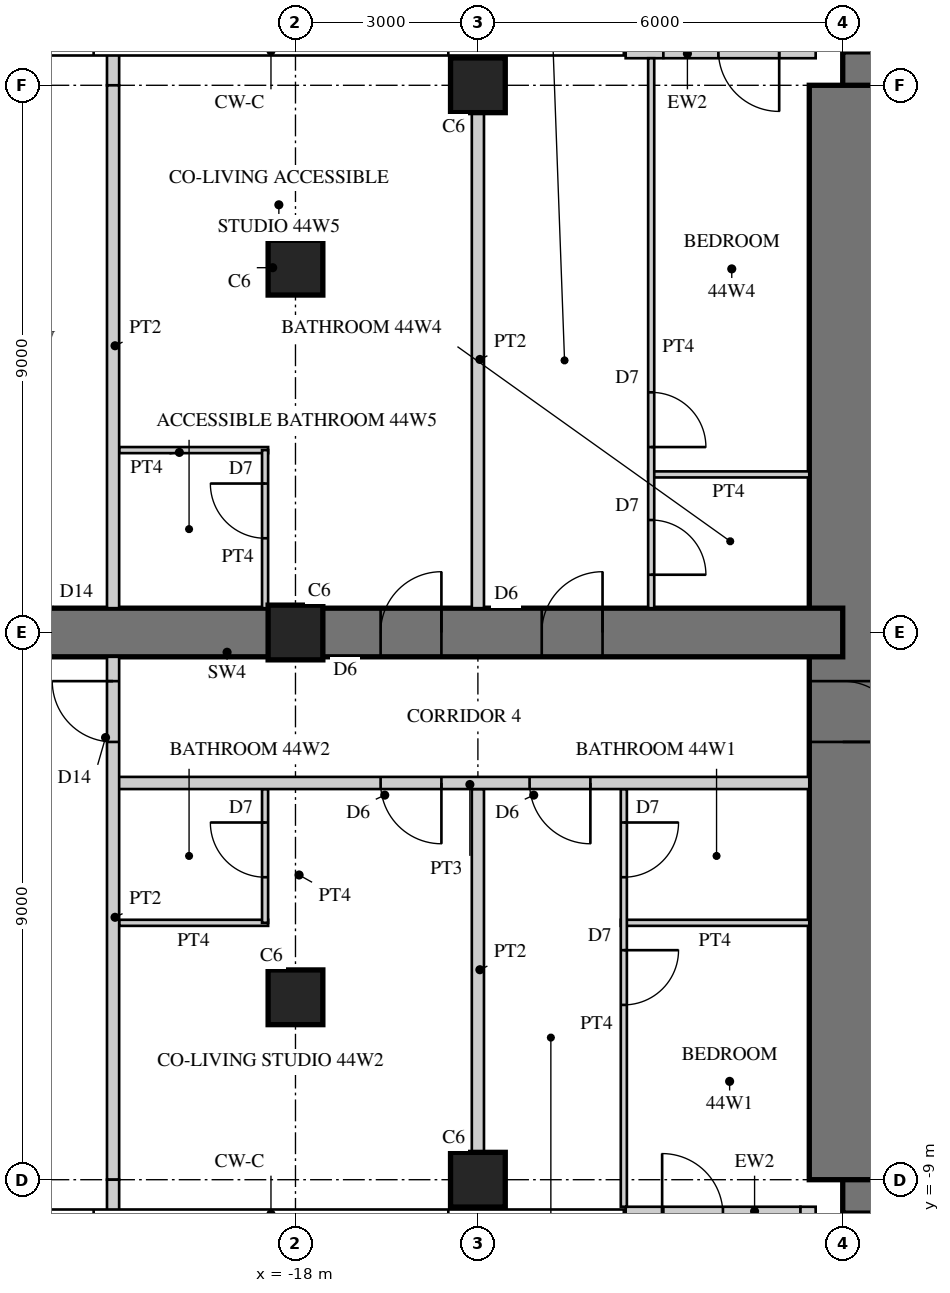
"""IFC4 building model, lengths in metres.
Left out: names, types, materials, properties, quantities, classifications, styles, units other than length and angle.
Written with IfcOpenShell. Run it as: python <this file> out.ifc"""

import sys

from ifc_helpers import new_model, si_unit, direction, frame, frame_2d, origin, origin_2d, place, context, subcontext, project, spatial, rectangle, hollow_rectangle, extrude, element, fill, save


model = new_model("IFC4")
c1 = context("Model", 3, precision=1e-05, world=origin(), true_north=direction((0.0, 1.0)))
c2 = subcontext(c1, "Body", "Model", "MODEL_VIEW")
j1 = project(units=[si_unit("LENGTHUNIT", "METRE"), si_unit("PLANEANGLEUNIT", "RADIAN")], contexts=[c1])
p1 = place(None, origin())
s1 = spatial("IfcSite", under=j1, at=p1, CompositionType="ELEMENT")
p2 = place(p1, origin())
s2 = spatial("IfcBuilding", under=s1, at=p2, CompositionType="ELEMENT")
p3 = place(p2, frame((0.0, 0.0, 179.7)))
s3 = spatial("IfcBuildingStorey", under=s2, at=p3, CompositionType="ELEMENT", Elevation=179.7)
p4 = place(p3, frame((9.0, 9.0, 0.0), z_axis=(0.0, 0.0, 1.0), x_axis=(-1.0, 0.0, 0.0)))
e1 = element("IfcWall", 1, at=p4, inside=s3, PredefinedType="SHEAR", context=c2, shape_type="SweptSolid", body=[
    extrude(rectangle(XDim=18.0, YDim=1.1, at=frame_2d((9.0, 0.0))), origin(), (0.0, 0.0, 1.0), 3.4),
])
p5 = place(p4, frame((9.8, 0.0, 0.0)))
e2 = element("IfcOpeningElement", 2, at=p5, cuts=e1, PredefinedType="OPENING", context=c2, shape_type="SweptSolid", body=[
    extrude(rectangle(XDim=1.0, YDim=2.4, at=frame_2d((0.5, 1.2))), frame((0.0, 0.56, 0.0), z_axis=(0.0, -1.0, 0.0), x_axis=(1.0, 0.0, 0.0)), (0.0, 0.0, 1.0), 1.12),
])
p6 = place(p3, frame((-9.0, -9.0, 0.0), z_axis=(0.0, 0.0, 1.0), x_axis=(1.0, 0.0, 0.0)))
e3 = element("IfcWall", 3, at=p6, inside=s3, PredefinedType="SHEAR", context=c2, shape_type="SweptSolid", body=[
    extrude(rectangle(XDim=18.0, YDim=1.1, at=frame_2d((9.0, 0.0))), origin(), (0.0, 0.0, 1.0), 3.4),
])
p7 = place(p6, frame((9.8, 0.0, 0.0)))
e4 = element("IfcOpeningElement", 4, at=p7, cuts=e3, PredefinedType="OPENING", context=c2, shape_type="SweptSolid", body=[
    extrude(rectangle(XDim=1.0, YDim=2.4, at=frame_2d((0.5, 1.2))), frame((0.0, 0.56, 0.0), z_axis=(0.0, -1.0, 0.0), x_axis=(1.0, 0.0, 0.0)), (0.0, 0.0, 1.0), 1.12),
])
p8 = place(p3, frame((-9.0, 9.0, 0.0), z_axis=(0.0, 0.0, 1.0), x_axis=(0.0, -1.0, 0.0)))
e5 = element("IfcWall", 5, at=p8, inside=s3, PredefinedType="SHEAR", context=c2, shape_type="SweptSolid", body=[
    extrude(rectangle(XDim=18.0, YDim=1.1, at=frame_2d((9.0, 0.0))), origin(), (0.0, 0.0, 1.0), 3.4),
])
p9 = place(p8, frame((9.8, 0.0, 0.0)))
e6 = element("IfcOpeningElement", 6, at=p9, cuts=e5, PredefinedType="OPENING", context=c2, shape_type="SweptSolid", body=[
    extrude(rectangle(XDim=1.0, YDim=2.4, at=frame_2d((0.5, 1.2))), frame((0.0, 0.56, 0.0), z_axis=(0.0, -1.0, 0.0), x_axis=(1.0, 0.0, 0.0)), (0.0, 0.0, 1.0), 1.12),
])
p10 = place(p3, frame((-9.0, 0.0, 0.0), z_axis=(0.0, 0.0, 1.0), x_axis=(-1.0, 0.0, 0.0)))
e7 = element("IfcWall", 7, at=p10, inside=s3, PredefinedType="SHEAR", context=c2, shape_type="SweptSolid", body=[
    extrude(rectangle(XDim=18.0, YDim=0.8, at=frame_2d((9.0, 0.0))), origin(), (0.0, 0.0, 1.0), 3.4),
])
p11 = place(p10, frame((3.95, 0.0, 0.0)))
e8 = element("IfcOpeningElement", 8, at=p11, cuts=e7, PredefinedType="OPENING", context=c2, shape_type="SweptSolid", body=[
    extrude(rectangle(XDim=1.0, YDim=2.15, at=frame_2d((0.5, 1.075))), frame((0.0, 0.41, 0.0), z_axis=(0.0, -1.0, 0.0), x_axis=(1.0, 0.0, 0.0)), (0.0, 0.0, 1.0), 0.82),
])
p12 = place(p10, frame((6.6, 0.0, 0.0)))
e9 = element("IfcOpeningElement", 9, at=p12, cuts=e7, PredefinedType="OPENING", context=c2, shape_type="SweptSolid", body=[
    extrude(rectangle(XDim=1.0, YDim=2.15, at=frame_2d((0.5, 1.075))), frame((0.0, 0.41, 0.0), z_axis=(0.0, -1.0, 0.0), x_axis=(1.0, 0.0, 0.0)), (0.0, 0.0, 1.0), 0.82),
])
p13 = place(p10, frame((13.25, 0.0, 0.0)))
e10 = element("IfcOpeningElement", 10, at=p13, cuts=e7, PredefinedType="OPENING", context=c2, shape_type="SweptSolid", body=[
    extrude(rectangle(XDim=1.0, YDim=2.2, at=frame_2d((0.5, 1.1))), frame((0.0, 0.41, 0.0), z_axis=(0.0, -1.0, 0.0), x_axis=(1.0, 0.0, 0.0)), (0.0, 0.0, 1.0), 0.82),
])
for number, where, z_axis, x_axis in (
    (11, (-15.0, 9.0, 0.0), (0.0, 0.0, 1.0), (1.0, 0.0, 0.0)),
    (12, (-15.0, -9.0, 0.0), (0.0, 0.0, 1.0), (1.0, 0.0, 0.0)),
    (13, (-18.0, 6.0, 0.0), (0.0, 0.0, 1.0), (1.0, 0.0, 0.0)),
    (14, (-18.0, 0.0, 0.0), (0.0, 0.0, 1.0), (1.0, 0.0, 0.0)),
    (15, (-18.0, -6.0, 0.0), (0.0, 0.0, 1.0), (1.0, 0.0, 0.0)),
):
    element("IfcColumn", number, at=place(p3, frame(where, z_axis=z_axis, x_axis=x_axis)), inside=s3, PredefinedType="COLUMN", context=c2, shape_type="SweptSolid", body=[
        extrude(rectangle(XDim=0.9, YDim=0.9, at=origin_2d()), origin(), (0.0, 0.0, 1.0), 3.4),
    ])
p14 = place(p3, frame((-9.445, 9.57, 0.0), z_axis=(0.0, 0.0, 1.0), x_axis=(-1.0, 0.0, 0.0)))
e16 = element("IfcWall", 16, at=p14, inside=s3, PredefinedType="SOLIDWALL", context=c2, shape_type="SweptSolid", body=[
    extrude(rectangle(XDim=3.125, YDim=0.25, at=frame_2d((1.562, 0.0))), origin(), (0.0, 0.0, 1.0), 3.22),
])
p15 = place(p14, frame((0.6, 0.0, 0.0)))
e17 = element("IfcOpeningElement", 17, at=p15, cuts=e16, PredefinedType="OPENING", context=c2, shape_type="SweptSolid", body=[
    extrude(rectangle(XDim=1.0, YDim=2.2, at=frame_2d((0.5, 1.1))), frame((0.0, 0.135, 0.0), z_axis=(0.0, -1.0, 0.0), x_axis=(1.0, 0.0, 0.0)), (0.0, 0.0, 1.0), 0.27),
])
p16 = place(p3, frame((-12.57, -9.57, 0.0), z_axis=(0.0, 0.0, 1.0), x_axis=(1.0, 0.0, 0.0)))
e18 = element("IfcWall", 18, at=p16, inside=s3, PredefinedType="SOLIDWALL", context=c2, shape_type="SweptSolid", body=[
    extrude(rectangle(XDim=2.875, YDim=0.25, at=frame_2d((1.438, 0.0))), origin(), (0.0, 0.0, 1.0), 3.22),
])
p17 = place(p16, frame((0.6, 0.0, 0.0)))
e19 = element("IfcOpeningElement", 19, at=p17, cuts=e18, PredefinedType="OPENING", context=c2, shape_type="SweptSolid", body=[
    extrude(rectangle(XDim=1.0, YDim=2.2, at=frame_2d((0.5, 1.1))), frame((0.0, 0.135, 0.0), z_axis=(0.0, -1.0, 0.0), x_axis=(1.0, 0.0, 0.0)), (0.0, 0.0, 1.0), 0.27),
])
p18 = place(p3, frame((-9.57, -9.445, 0.0), z_axis=(0.0, 0.0, 1.0), x_axis=(0.0, -1.0, 0.0)))
e20 = element("IfcWall", 20, at=p18, inside=s3, PredefinedType="SOLIDWALL", context=c2, shape_type="SweptSolid", body=[
    extrude(rectangle(XDim=3.125, YDim=0.25, at=frame_2d((1.562, 0.0))), origin(), (0.0, 0.0, 1.0), 3.22),
])
p19 = place(p18, frame((0.6, 0.0, 0.0)))
e21 = element("IfcOpeningElement", 21, at=p19, cuts=e20, PredefinedType="OPENING", context=c2, shape_type="SweptSolid", body=[
    extrude(rectangle(XDim=1.0, YDim=2.2, at=frame_2d((0.5, 1.1))), frame((0.0, 0.135, 0.0), z_axis=(0.0, -1.0, 0.0), x_axis=(1.0, 0.0, 0.0)), (0.0, 0.0, 1.0), 0.27),
])
p20 = place(p3, frame((-9.55, -4.775, 0.0), z_axis=(0.0, 0.0, 1.0), x_axis=(-1.0, 0.0, 0.0)))
e22 = element("IfcWall", 22, at=p20, inside=s3, PredefinedType="PARTITIONING", context=c2, shape_type="SweptSolid", body=[
    extrude(rectangle(XDim=3.1, YDim=0.1, at=frame_2d((1.55, 0.0))), origin(), (0.0, 0.0, 1.0), 3.22),
])
p21 = place(p3, frame((-12.6, -2.575, 0.0), z_axis=(0.0, 0.0, 1.0), x_axis=(0.0, -1.0, 0.0)))
e23 = element("IfcWall", 23, at=p21, inside=s3, PredefinedType="PARTITIONING", context=c2, shape_type="SweptSolid", body=[
    extrude(rectangle(XDim=6.87, YDim=0.1, at=frame_2d((3.435, 0.0))), origin(), (0.0, 0.0, 1.0), 3.22),
])
p22 = place(p21, frame((0.55, 0.0, 0.0)))
e24 = element("IfcOpeningElement", 24, at=p22, cuts=e23, PredefinedType="OPENING", context=c2, shape_type="SweptSolid", body=[
    extrude(rectangle(XDim=0.9, YDim=2.1, at=frame_2d((0.45, 1.05))), frame((0.0, 0.06, 0.0), z_axis=(0.0, -1.0, 0.0), x_axis=(1.0, 0.0, 0.0)), (0.0, 0.0, 1.0), 0.12),
])
p23 = place(p21, frame((2.65, 0.0, 0.0)))
e25 = element("IfcOpeningElement", 25, at=p23, cuts=e23, PredefinedType="OPENING", context=c2, shape_type="SweptSolid", body=[
    extrude(rectangle(XDim=0.9, YDim=2.1, at=frame_2d((0.45, 1.05))), frame((0.0, 0.06, 0.0), z_axis=(0.0, -1.0, 0.0), x_axis=(1.0, 0.0, 0.0)), (0.0, 0.0, 1.0), 0.12),
])
p24 = place(p3, frame((-9.55, 2.6, 0.0), z_axis=(0.0, 0.0, 1.0), x_axis=(-1.0, 0.0, 0.0)))
e26 = element("IfcWall", 26, at=p24, inside=s3, PredefinedType="PARTITIONING", context=c2, shape_type="SweptSolid", body=[
    extrude(rectangle(XDim=2.65, YDim=0.1, at=frame_2d((1.325, 0.0))), origin(), (0.0, 0.0, 1.0), 3.22),
])
p25 = place(p3, frame((-12.15, 9.445, 0.0), z_axis=(0.0, 0.0, 1.0), x_axis=(0.0, -1.0, 0.0)))
e27 = element("IfcWall", 27, at=p25, inside=s3, PredefinedType="PARTITIONING", context=c2, shape_type="SweptSolid", body=[
    extrude(rectangle(XDim=9.045, YDim=0.1, at=frame_2d((4.522, 0.0))), origin(), (0.0, 0.0, 1.0), 3.22),
])
p26 = place(p25, frame((5.495, 0.0, 0.0)))
e28 = element("IfcOpeningElement", 28, at=p26, cuts=e27, PredefinedType="OPENING", context=c2, shape_type="SweptSolid", body=[
    extrude(rectangle(XDim=0.9, YDim=2.1, at=frame_2d((0.45, 1.05))), frame((0.0, 0.06, 0.0), z_axis=(0.0, -1.0, 0.0), x_axis=(1.0, 0.0, 0.0)), (0.0, 0.0, 1.0), 0.12),
])
p27 = place(p25, frame((7.595, 0.0, 0.0)))
e29 = element("IfcOpeningElement", 29, at=p27, cuts=e27, PredefinedType="OPENING", context=c2, shape_type="SweptSolid", body=[
    extrude(rectangle(XDim=0.9, YDim=2.1, at=frame_2d((0.45, 1.05))), frame((0.0, 0.06, 0.0), z_axis=(0.0, -1.0, 0.0), x_axis=(1.0, 0.0, 0.0)), (0.0, 0.0, 1.0), 0.12),
])
p28 = place(p3, frame((-15.0, -2.575, 0.0), z_axis=(0.0, 0.0, 1.0), x_axis=(0.0, -1.0, 0.0)))
e30 = element("IfcWall", 30, at=p28, inside=s3, PredefinedType="SOLIDWALL", context=c2, shape_type="SweptSolid", body=[
    extrude(rectangle(XDim=5.975, YDim=0.2, at=frame_2d((2.988, 0.0))), origin(), (0.0, 0.0, 1.0), 2.47),
])
p29 = place(p3, frame((-15.0, 8.55, 0.0), z_axis=(0.0, 0.0, 1.0), x_axis=(0.0, -1.0, 0.0)))
e31 = element("IfcWall", 31, at=p29, inside=s3, PredefinedType="SOLIDWALL", context=c2, shape_type="SweptSolid", body=[
    extrude(rectangle(XDim=8.15, YDim=0.2, at=frame_2d((4.075, 0.0))), origin(), (0.0, 0.0, 1.0), 2.47),
])
p30 = place(p3, frame((-18.45, -4.775, 0.0), z_axis=(0.0, 0.0, 1.0), x_axis=(-1.0, 0.0, 0.0)))
e32 = element("IfcWall", 32, at=p30, inside=s3, PredefinedType="PARTITIONING", context=c2, shape_type="SweptSolid", body=[
    extrude(rectangle(XDim=2.45, YDim=0.1, at=frame_2d((1.225, 0.0))), origin(), (0.0, 0.0, 1.0), 3.22),
])
p31 = place(p3, frame((-18.5, -2.575, 0.0), z_axis=(0.0, 0.0, 1.0), x_axis=(0.0, -1.0, 0.0)))
e33 = element("IfcWall", 33, at=p31, inside=s3, PredefinedType="PARTITIONING", context=c2, shape_type="SweptSolid", body=[
    extrude(rectangle(XDim=2.2, YDim=0.1, at=frame_2d((1.1, 0.0))), origin(), (0.0, 0.0, 1.0), 3.22),
])
p32 = place(p31, frame((0.55, 0.0, 0.0)))
e34 = element("IfcOpeningElement", 34, at=p32, cuts=e33, PredefinedType="OPENING", context=c2, shape_type="SweptSolid", body=[
    extrude(rectangle(XDim=0.9, YDim=2.1, at=frame_2d((0.45, 1.05))), frame((0.0, 0.06, 0.0), z_axis=(0.0, -1.0, 0.0), x_axis=(1.0, 0.0, 0.0)), (0.0, 0.0, 1.0), 0.12),
])
p33 = place(p3, frame((-18.45, 3.0, 0.0), z_axis=(0.0, 0.0, 1.0), x_axis=(-1.0, 0.0, 0.0)))
e35 = element("IfcWall", 35, at=p33, inside=s3, PredefinedType="PARTITIONING", context=c2, shape_type="SweptSolid", body=[
    extrude(rectangle(XDim=2.45, YDim=0.1, at=frame_2d((1.225, 0.0))), origin(), (0.0, 0.0, 1.0), 3.22),
])
p34 = place(p3, frame((-18.5, 3.0, 0.0), z_axis=(0.0, 0.0, 1.0), x_axis=(0.0, -1.0, 0.0)))
e36 = element("IfcWall", 36, at=p34, inside=s3, PredefinedType="PARTITIONING", context=c2, shape_type="SweptSolid", body=[
    extrude(rectangle(XDim=2.6, YDim=0.1, at=frame_2d((1.3, 0.0))), origin(), (0.0, 0.0, 1.0), 3.22),
])
p35 = place(p34, frame((0.55, 0.0, 0.0)))
e37 = element("IfcOpeningElement", 37, at=p35, cuts=e36, PredefinedType="OPENING", context=c2, shape_type="SweptSolid", body=[
    extrude(rectangle(XDim=0.9, YDim=2.1, at=frame_2d((0.45, 1.05))), frame((0.0, 0.06, 0.0), z_axis=(0.0, -1.0, 0.0), x_axis=(1.0, 0.0, 0.0)), (0.0, 0.0, 1.0), 0.12),
])
p36 = place(p3, frame((-9.55, -2.475, 0.0), z_axis=(0.0, 0.0, 1.0), x_axis=(-1.0, 0.0, 0.0)))
e38 = element("IfcWall", 38, at=p36, inside=s3, PredefinedType="SOLIDWALL", context=c2, shape_type="SweptSolid", body=[
    extrude(rectangle(XDim=11.45, YDim=0.2, at=frame_2d((5.725, 0.0))), origin(), (0.0, 0.0, 1.0), 3.22),
])
p37 = place(p36, frame((3.6, 0.0, 0.0)))
e39 = element("IfcOpeningElement", 39, at=p37, cuts=e38, PredefinedType="OPENING", context=c2, shape_type="SweptSolid", body=[
    extrude(rectangle(XDim=1.0, YDim=2.15, at=frame_2d((0.5, 1.075))), frame((0.0, 0.11, 0.0), z_axis=(0.0, -1.0, 0.0), x_axis=(1.0, 0.0, 0.0)), (0.0, 0.0, 1.0), 0.22),
])
p38 = place(p36, frame((6.05, 0.0, 0.0)))
e40 = element("IfcOpeningElement", 40, at=p38, cuts=e38, PredefinedType="OPENING", context=c2, shape_type="SweptSolid", body=[
    extrude(rectangle(XDim=1.0, YDim=2.15, at=frame_2d((0.5, 1.075))), frame((0.0, 0.11, 0.0), z_axis=(0.0, -1.0, 0.0), x_axis=(1.0, 0.0, 0.0)), (0.0, 0.0, 1.0), 0.22),
])
p39 = place(p3, frame((-21.0, 9.53, 0.0), z_axis=(0.0, 0.0, 1.0), x_axis=(0.0, -1.0, 0.0)))
e41 = element("IfcWall", 41, at=p39, inside=s3, PredefinedType="SOLIDWALL", context=c2, shape_type="SweptSolid", body=[
    extrude(rectangle(XDim=0.53, YDim=0.2, at=frame_2d((0.265, 0.0))), origin(), (0.0, 0.0, 1.0), 3.22),
])
p40 = place(p3, frame((-21.0, 9.0, 0.0), z_axis=(0.0, 0.0, 1.0), x_axis=(0.0, -1.0, 0.0)))
e42 = element("IfcWall", 42, at=p40, inside=s3, PredefinedType="SOLIDWALL", context=c2, shape_type="SweptSolid", body=[
    extrude(rectangle(XDim=8.6, YDim=0.2, at=frame_2d((4.3, 0.0))), origin(), (0.0, 0.0, 1.0), 2.62),
])
p41 = place(p3, frame((-21.0, -0.4, 0.0), z_axis=(0.0, 0.0, 1.0), x_axis=(0.0, -1.0, 0.0)))
e43 = element("IfcWall", 43, at=p41, inside=s3, PredefinedType="SOLIDWALL", context=c2, shape_type="SweptSolid", body=[
    extrude(rectangle(XDim=8.6, YDim=0.2, at=frame_2d((4.3, 0.0))), origin(), (0.0, 0.0, 1.0), 2.62),
])
p42 = place(p41, frame((0.4, 0.0, 0.0)))
e44 = element("IfcOpeningElement", 44, at=p42, cuts=e43, PredefinedType="OPENING", context=c2, shape_type="SweptSolid", body=[
    extrude(rectangle(XDim=1.0, YDim=2.2, at=frame_2d((0.5, 1.1))), frame((0.0, 0.11, 0.0), z_axis=(0.0, -1.0, 0.0), x_axis=(1.0, 0.0, 0.0)), (0.0, 0.0, 1.0), 0.22),
])
p43 = place(p3, frame((-21.0, -9.0, 0.0), z_axis=(0.0, 0.0, 1.0), x_axis=(0.0, -1.0, 0.0)))
e45 = element("IfcWall", 45, at=p43, inside=s3, PredefinedType="SOLIDWALL", context=c2, shape_type="SweptSolid", body=[
    extrude(rectangle(XDim=0.53, YDim=0.2, at=frame_2d((0.265, 0.0))), origin(), (0.0, 0.0, 1.0), 3.22),
])
p44 = place(p15, origin())
e46 = element("IfcDoor", 46, at=p44, inside=s3, OperationType="SINGLE_SWING_LEFT", PredefinedType="DOOR", context=c2, shape_type="SweptSolid", body=[
    extrude(hollow_rectangle(XDim=1.0, YDim=2.2, WallThickness=0.06, at=frame_2d((0.5, 1.1))), frame((0.0, 0.025, 0.0), z_axis=(0.0, -1.0, 0.0), x_axis=(1.0, 0.0, 0.0)), (0.0, 0.0, 1.0), 0.05),
    extrude(rectangle(XDim=0.879, YDim=2.079, at=frame_2d((0.5, 1.1))), frame((0.0, 0.025, 0.0), z_axis=(0.0, -1.0, 0.0), x_axis=(1.0, 0.0, 0.0)), (0.0, 0.0, 1.0), 0.05),
])
fill(e17, e46)
p45 = place(p17, origin())
e47 = element("IfcDoor", 47, at=p45, inside=s3, OperationType="SINGLE_SWING_LEFT", PredefinedType="DOOR", context=c2, shape_type="SweptSolid", body=[
    extrude(hollow_rectangle(XDim=1.0, YDim=2.2, WallThickness=0.06, at=frame_2d((0.5, 1.1))), frame((0.0, 0.025, 0.0), z_axis=(0.0, -1.0, 0.0), x_axis=(1.0, 0.0, 0.0)), (0.0, 0.0, 1.0), 0.05),
    extrude(rectangle(XDim=0.879, YDim=2.079, at=frame_2d((0.5, 1.1))), frame((0.0, 0.025, 0.0), z_axis=(0.0, -1.0, 0.0), x_axis=(1.0, 0.0, 0.0)), (0.0, 0.0, 1.0), 0.05),
])
fill(e19, e47)
p46 = place(p22, origin())
e48 = element("IfcDoor", 48, at=p46, inside=s3, OperationType="SINGLE_SWING_LEFT", PredefinedType="DOOR", context=c2, shape_type="SweptSolid", body=[
    extrude(rectangle(XDim=0.9, YDim=2.1, at=frame_2d((0.45, 1.05))), frame((0.0, 0.025, 0.0), z_axis=(0.0, -1.0, 0.0), x_axis=(1.0, 0.0, 0.0)), (0.0, 0.0, 1.0), 0.05),
])
fill(e24, e48)
p47 = place(p23, origin())
e49 = element("IfcDoor", 49, at=p47, inside=s3, OperationType="SINGLE_SWING_LEFT", PredefinedType="DOOR", context=c2, shape_type="SweptSolid", body=[
    extrude(rectangle(XDim=0.9, YDim=2.1, at=frame_2d((0.45, 1.05))), frame((0.0, 0.025, 0.0), z_axis=(0.0, -1.0, 0.0), x_axis=(1.0, 0.0, 0.0)), (0.0, 0.0, 1.0), 0.05),
])
fill(e25, e49)
p48 = place(p26, origin())
e50 = element("IfcDoor", 50, at=p48, inside=s3, OperationType="SINGLE_SWING_RIGHT", PredefinedType="DOOR", context=c2, shape_type="SweptSolid", body=[
    extrude(rectangle(XDim=0.9, YDim=2.1, at=frame_2d((0.45, 1.05))), frame((0.0, 0.025, 0.0), z_axis=(0.0, -1.0, 0.0), x_axis=(1.0, 0.0, 0.0)), (0.0, 0.0, 1.0), 0.05),
])
fill(e28, e50)
p49 = place(p27, origin())
e51 = element("IfcDoor", 51, at=p49, inside=s3, OperationType="SINGLE_SWING_RIGHT", PredefinedType="DOOR", context=c2, shape_type="SweptSolid", body=[
    extrude(rectangle(XDim=0.9, YDim=2.1, at=frame_2d((0.45, 1.05))), frame((0.0, 0.025, 0.0), z_axis=(0.0, -1.0, 0.0), x_axis=(1.0, 0.0, 0.0)), (0.0, 0.0, 1.0), 0.05),
])
fill(e29, e51)
p50 = place(p32, frame((0.9, 0.0, 0.0), z_axis=(0.0, 0.0, 1.0), x_axis=(-1.0, 0.0, 0.0)))
e52 = element("IfcDoor", 52, at=p50, inside=s3, OperationType="SINGLE_SWING_RIGHT", PredefinedType="DOOR", context=c2, shape_type="SweptSolid", body=[
    extrude(rectangle(XDim=0.9, YDim=2.1, at=frame_2d((0.45, 1.05))), frame((0.0, 0.025, 0.0), z_axis=(0.0, -1.0, 0.0), x_axis=(1.0, 0.0, 0.0)), (0.0, 0.0, 1.0), 0.05),
])
fill(e34, e52)
p51 = place(p35, frame((0.9, 0.0, 0.0), z_axis=(0.0, 0.0, 1.0), x_axis=(-1.0, 0.0, 0.0)))
e53 = element("IfcDoor", 53, at=p51, inside=s3, OperationType="SINGLE_SWING_RIGHT", PredefinedType="DOOR", context=c2, shape_type="SweptSolid", body=[
    extrude(rectangle(XDim=0.9, YDim=2.1, at=frame_2d((0.45, 1.05))), frame((0.0, 0.025, 0.0), z_axis=(0.0, -1.0, 0.0), x_axis=(1.0, 0.0, 0.0)), (0.0, 0.0, 1.0), 0.05),
])
fill(e37, e53)
p52 = place(p37, origin())
e54 = element("IfcDoor", 54, at=p52, inside=s3, OperationType="SINGLE_SWING_LEFT", PredefinedType="DOOR", context=c2, shape_type="SweptSolid", body=[
    extrude(rectangle(XDim=1.0, YDim=2.15, at=frame_2d((0.5, 1.075))), frame((0.0, 0.025, 0.0), z_axis=(0.0, -1.0, 0.0), x_axis=(1.0, 0.0, 0.0)), (0.0, 0.0, 1.0), 0.05),
])
fill(e39, e54)
p53 = place(p38, origin())
e55 = element("IfcDoor", 55, at=p53, inside=s3, OperationType="SINGLE_SWING_LEFT", PredefinedType="DOOR", context=c2, shape_type="SweptSolid", body=[
    extrude(rectangle(XDim=1.0, YDim=2.15, at=frame_2d((0.5, 1.075))), frame((0.0, 0.025, 0.0), z_axis=(0.0, -1.0, 0.0), x_axis=(1.0, 0.0, 0.0)), (0.0, 0.0, 1.0), 0.05),
])
fill(e40, e55)
p54 = place(p42, frame((1.0, 0.0, 0.0), z_axis=(0.0, 0.0, 1.0), x_axis=(-1.0, 0.0, 0.0)))
e56 = element("IfcDoor", 56, at=p54, inside=s3, OperationType="SINGLE_SWING_RIGHT", PredefinedType="DOOR", context=c2, shape_type="SweptSolid", body=[
    extrude(rectangle(XDim=1.0, YDim=2.2, at=frame_2d((0.5, 1.1))), frame((0.0, 0.025, 0.0), z_axis=(0.0, -1.0, 0.0), x_axis=(1.0, 0.0, 0.0)), (0.0, 0.0, 1.0), 0.05),
])
fill(e44, e56)
p55 = place(p11, frame((1.0, 0.0, 0.0), z_axis=(0.0, 0.0, 1.0), x_axis=(-1.0, 0.0, 0.0)))
e57 = element("IfcDoor", 57, at=p55, inside=s3, OperationType="SINGLE_SWING_RIGHT", PredefinedType="DOOR", context=c2, shape_type="SweptSolid", body=[
    extrude(rectangle(XDim=1.0, YDim=2.15, at=frame_2d((0.5, 1.075))), frame((0.0, 0.025, 0.0), z_axis=(0.0, -1.0, 0.0), x_axis=(1.0, 0.0, 0.0)), (0.0, 0.0, 1.0), 0.05),
])
fill(e8, e57)
p56 = place(p12, frame((1.0, 0.0, 0.0), z_axis=(0.0, 0.0, 1.0), x_axis=(-1.0, 0.0, 0.0)))
e58 = element("IfcDoor", 58, at=p56, inside=s3, OperationType="SINGLE_SWING_RIGHT", PredefinedType="DOOR", context=c2, shape_type="SweptSolid", body=[
    extrude(rectangle(XDim=1.0, YDim=2.15, at=frame_2d((0.5, 1.075))), frame((0.0, 0.025, 0.0), z_axis=(0.0, -1.0, 0.0), x_axis=(1.0, 0.0, 0.0)), (0.0, 0.0, 1.0), 0.05),
])
fill(e9, e58)
p57 = place(p9, origin())
e59 = element("IfcDoor", 59, at=p57, inside=s3, OperationType="SINGLE_SWING_RIGHT", PredefinedType="DOOR", context=c2, shape_type="SweptSolid", body=[
    extrude(rectangle(XDim=1.0, YDim=2.4, at=frame_2d((0.5, 1.2))), frame((0.0, 0.055, 0.0), z_axis=(0.0, -1.0, 0.0), x_axis=(1.0, 0.0, 0.0)), (0.0, 0.0, 1.0), 0.05),
])
fill(e6, e59)
save(model, sys.argv[1])
